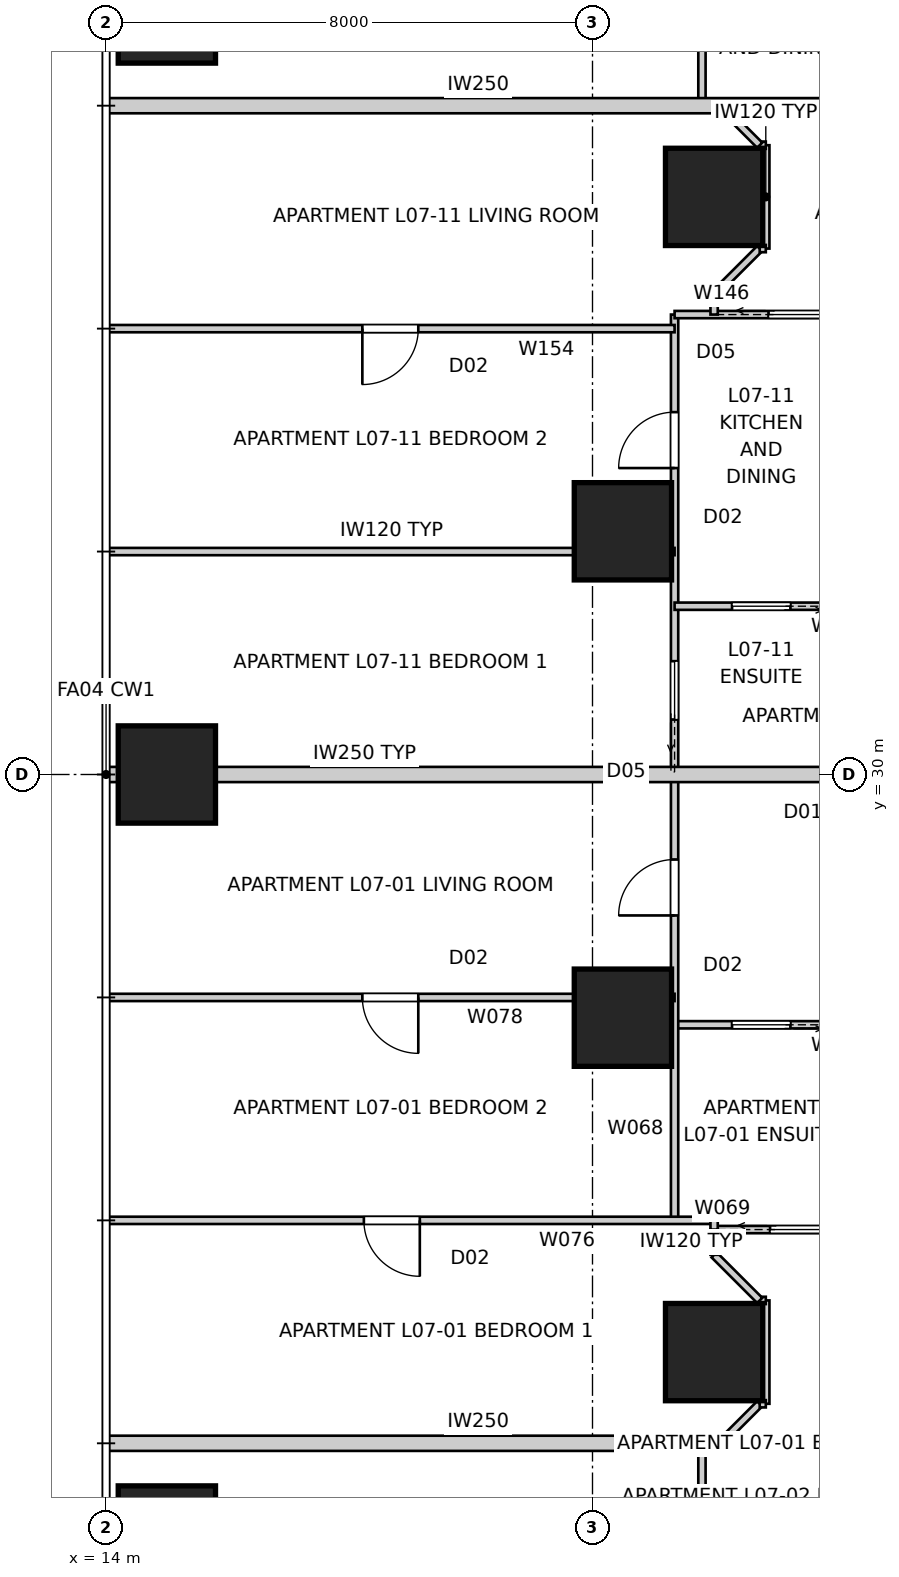
"""IFC4 building model, lengths in metres.
Left out: names, types, materials, properties, quantities, classifications, styles, units other than length and angle.
Written with IfcOpenShell. Run it as: python <this file> out.ifc"""

import sys

from ifc_helpers import new_model, si_unit, direction, frame, frame_2d, origin, origin_2d, place, context, subcontext, project, spatial, rectangle, extrude, element, fill, save


model = new_model("IFC4")
c1 = context("Model", 3, precision=1e-05, world=origin(), true_north=direction((0.0, 1.0)))
c2 = subcontext(c1, "Body", "Model", "MODEL_VIEW")
j1 = project(units=[si_unit("LENGTHUNIT", "METRE"), si_unit("PLANEANGLEUNIT", "RADIAN")], contexts=[c1])
p1 = place(None, origin())
s1 = spatial("IfcSite", under=j1, at=p1, CompositionType="ELEMENT")
p2 = place(p1, origin())
s2 = spatial("IfcBuilding", under=s1, at=p2, CompositionType="ELEMENT")
p3 = place(p2, frame((0.0, 0.0, 28.6)))
s3 = spatial("IfcBuildingStorey", under=s2, at=p3, CompositionType="ELEMENT", Elevation=28.6)
for number, where, z_axis, x_axis in (
    (1, (15.0, 42.5, 0.0), (0.0, 0.0, 1.0), (1.0, 0.0, 0.0)),
    (2, (15.0, 30.0, 0.0), (0.0, 0.0, 1.0), (1.0, 0.0, 0.0)),
    (3, (15.0, 17.5, 0.0), (0.0, 0.0, 1.0), (1.0, 0.0, 0.0)),
    (4, (24.0, 39.5, 0.0), (0.0, 0.0, 1.0), (1.0, 0.0, 0.0)),
    (5, (22.5, 34.0, 0.0), (0.0, 0.0, 1.0), (1.0, 0.0, 0.0)),
    (6, (22.5, 26.0, 0.0), (0.0, 0.0, 1.0), (1.0, 0.0, 0.0)),
    (7, (24.0, 20.5, 0.0), (0.0, 0.0, 1.0), (1.0, 0.0, 0.0)),
):
    element("IfcColumn", number, at=place(p3, frame(where, z_axis=z_axis, x_axis=x_axis)), inside=s3, PredefinedType="COLUMN", context=c2, shape_type="SweptSolid", body=[
        extrude(rectangle(XDim=1.6, YDim=1.6, at=origin_2d()), origin(), (0.0, 0.0, 1.0), 3.4),
    ])
for number, where, z_axis, x_axis in (
    (8, (14.0, 41.0, 0.0), (0.0, 0.0, 1.0), (1.0, 0.0, 0.0)),
    (9, (14.0, 19.0, 0.0), (0.0, 0.0, 1.0), (1.0, 0.0, 0.0)),
):
    element("IfcWall", number, at=place(p3, frame(where, z_axis=z_axis, x_axis=x_axis)), inside=s3, PredefinedType="PARTITIONING", context=c2, shape_type="SweptSolid", body=[
        extrude(rectangle(XDim=12.24, YDim=0.25, at=frame_2d((6.12, 0.0))), origin(), (0.0, 0.0, 1.0), 3.25),
    ])
p4 = place(p3, frame((14.0, 30.0, 0.0), z_axis=(0.0, 0.0, 1.0), x_axis=(1.0, 0.0, 0.0)))
e10 = element("IfcWall", 10, at=p4, inside=s3, PredefinedType="PARTITIONING", context=c2, shape_type="SweptSolid", body=[
    extrude(rectangle(XDim=8.5, YDim=0.25, at=frame_2d((4.25, 0.0))), origin(), (0.0, 0.0, 1.0), 3.25),
])
p5 = place(p3, frame((22.5, 30.0, 0.0), z_axis=(0.0, 0.0, 1.0), x_axis=(1.0, 0.0, 0.0)))
e11 = element("IfcWall", 11, at=p5, inside=s3, PredefinedType="PARTITIONING", context=c2, shape_type="SweptSolid", body=[
    extrude(rectangle(XDim=3.74, YDim=0.25, at=frame_2d((1.87, 0.0))), origin(), (0.0, 0.0, 1.0), 2.796),
])
p6 = place(p3, frame((26.2, 25.884, 0.0), z_axis=(0.0, 0.0, 1.0), x_axis=(-1.0, 0.0, 0.0)))
e12 = element("IfcWall", 12, at=p6, inside=s3, PredefinedType="PARTITIONING", context=c2, shape_type="SweptSolid", body=[
    extrude(rectangle(XDim=2.85, YDim=0.12, at=frame_2d((1.425, 0.0))), origin(), (0.0, 0.0, 1.0), 3.25),
])
p7 = place(p6, frame((0.945, 0.0, 0.0)))
e13 = element("IfcOpeningElement", 13, at=p7, cuts=e12, PredefinedType="OPENING", context=c2, shape_type="SweptSolid", body=[
    extrude(rectangle(XDim=0.96, YDim=2.1, at=frame_2d((0.48, 1.05))), frame((0.0, 0.07, 0.0), z_axis=(0.0, -1.0, 0.0), x_axis=(1.0, 0.0, 0.0)), (0.0, 0.0, 1.0), 0.14),
])
p8 = place(p3, frame((23.35, 22.667, 0.0), z_axis=(0.0, 0.0, 1.0), x_axis=(0.0, 1.0, 0.0)))
e14 = element("IfcWall", 14, at=p8, inside=s3, PredefinedType="PARTITIONING", context=c2, shape_type="SweptSolid", body=[
    extrude(rectangle(XDim=14.898, YDim=0.12, at=frame_2d((7.449, 0.0))), origin(), (0.0, 0.0, 1.0), 2.55),
])
p9 = place(p8, frame((12.373, 0.0, 0.0)))
e15 = element("IfcOpeningElement", 15, at=p9, cuts=e14, PredefinedType="OPENING", context=c2, shape_type="SweptSolid", body=[
    extrude(rectangle(XDim=0.92, YDim=2.34, at=frame_2d((0.46, 1.17))), frame((0.0, 0.07, 0.0), z_axis=(0.0, -1.0, 0.0), x_axis=(1.0, 0.0, 0.0)), (0.0, 0.0, 1.0), 0.14),
])
p10 = place(p8, frame((5.015, 0.0, 0.0)))
e16 = element("IfcOpeningElement", 16, at=p10, cuts=e14, PredefinedType="OPENING", context=c2, shape_type="SweptSolid", body=[
    extrude(rectangle(XDim=0.92, YDim=2.34, at=frame_2d((0.46, 1.17))), frame((0.0, 0.07, 0.0), z_axis=(0.0, -1.0, 0.0), x_axis=(1.0, 0.0, 0.0)), (0.0, 0.0, 1.0), 0.14),
])
p11 = place(p8, frame((8.237, 0.0, 0.0)))
e17 = element("IfcOpeningElement", 17, at=p11, cuts=e14, PredefinedType="OPENING", context=c2, shape_type="SweptSolid", body=[
    extrude(rectangle(XDim=0.96, YDim=2.1, at=frame_2d((0.48, 1.05))), frame((0.0, 0.07, 0.0), z_axis=(0.0, -1.0, 0.0), x_axis=(1.0, 0.0, 0.0)), (0.0, 0.0, 1.0), 0.14),
])
p12 = place(p3, frame((24.0, 22.515, 0.0), z_axis=(0.0, 0.0, 1.0), x_axis=(1.0, 0.0, 0.0)))
e18 = element("IfcWall", 18, at=p12, inside=s3, PredefinedType="PARTITIONING", context=c2, shape_type="SweptSolid", body=[
    extrude(rectangle(XDim=2.2, YDim=0.12, at=frame_2d((1.1, 0.0))), origin(), (0.0, 0.0, 1.0), 3.25),
])
p13 = place(p12, frame((0.92, 0.0, 0.0)))
e19 = element("IfcOpeningElement", 19, at=p13, cuts=e18, PredefinedType="OPENING", context=c2, shape_type="SweptSolid", body=[
    extrude(rectangle(XDim=0.96, YDim=2.1, at=frame_2d((0.48, 1.05))), frame((0.0, 0.07, 0.0), z_axis=(0.0, -1.0, 0.0), x_axis=(1.0, 0.0, 0.0)), (0.0, 0.0, 1.0), 0.14),
])
p14 = place(p3, frame((24.1, 19.0, 0.0), z_axis=(0.0, 0.0, 1.0), x_axis=(0.707106781187, 0.707106781187, 0.0)))
e20 = element("IfcWall", 20, at=p14, inside=s3, PredefinedType="PARTITIONING", context=c2, shape_type="SweptSolid", body=[
    extrude(rectangle(XDim=0.919, YDim=0.12, at=frame_2d((0.459, 0.0))), origin(), (0.0, 0.0, 1.0), 3.25),
])
p15 = place(p3, frame((24.85, 19.65, 0.0), z_axis=(0.0, 0.0, 1.0), x_axis=(0.0, 1.0, 0.0)))
e21 = element("IfcWall", 21, at=p15, inside=s3, PredefinedType="PARTITIONING", context=c2, shape_type="SweptSolid", body=[
    extrude(rectangle(XDim=1.7, YDim=0.12, at=frame_2d((0.85, 0.0))), origin(), (0.0, 0.0, 1.0), 3.25),
])
p16 = place(p3, frame((24.75, 21.35, 0.0), z_axis=(0.0, 0.0, 1.0), x_axis=(-0.707106781187, 0.707106781187, 0.0)))
e22 = element("IfcWall", 22, at=p16, inside=s3, PredefinedType="PARTITIONING", context=c2, shape_type="SweptSolid", body=[
    extrude(rectangle(XDim=1.061, YDim=0.12, at=frame_2d((0.53, 0.0))), origin(), (0.0, 0.0, 1.0), 3.25),
])
p17 = place(p3, frame((24.0, 22.1, 0.0), z_axis=(0.0, 0.0, 1.0), x_axis=(0.0, 1.0, 0.0)))
e23 = element("IfcWall", 23, at=p17, inside=s3, PredefinedType="PARTITIONING", context=c2, shape_type="SweptSolid", body=[
    extrude(rectangle(XDim=0.415, YDim=0.12, at=frame_2d((0.208, 0.0))), origin(), (0.0, 0.0, 1.0), 3.25),
])
p18 = place(p3, frame((24.0, 22.667, 0.0), z_axis=(0.0, 0.0, 1.0), x_axis=(-1.0, 0.0, 0.0)))
e24 = element("IfcWall", 24, at=p18, inside=s3, PredefinedType="PARTITIONING", context=c2, shape_type="SweptSolid", body=[
    extrude(rectangle(XDim=9.96, YDim=0.12, at=frame_2d((4.98, 0.0))), origin(), (0.0, 0.0, 1.0), 3.25),
])
p19 = place(p18, frame((4.84, 0.0, 0.0)))
e25 = element("IfcOpeningElement", 25, at=p19, cuts=e24, PredefinedType="OPENING", context=c2, shape_type="SweptSolid", body=[
    extrude(rectangle(XDim=0.92, YDim=2.34, at=frame_2d((0.46, 1.17))), frame((0.0, 0.07, 0.0), z_axis=(0.0, -1.0, 0.0), x_axis=(1.0, 0.0, 0.0)), (0.0, 0.0, 1.0), 0.14),
])
p20 = place(p3, frame((23.35, 26.333, 0.0), z_axis=(0.0, 0.0, 1.0), x_axis=(-1.0, 0.0, 0.0)))
e26 = element("IfcWall", 26, at=p20, inside=s3, PredefinedType="PARTITIONING", context=c2, shape_type="SweptSolid", body=[
    extrude(rectangle(XDim=9.31, YDim=0.12, at=frame_2d((4.655, 0.0))), origin(), (0.0, 0.0, 1.0), 3.25),
])
p21 = place(p20, frame((4.215, 0.0, 0.0)))
e27 = element("IfcOpeningElement", 27, at=p21, cuts=e26, PredefinedType="OPENING", context=c2, shape_type="SweptSolid", body=[
    extrude(rectangle(XDim=0.92, YDim=2.34, at=frame_2d((0.46, 1.17))), frame((0.0, 0.07, 0.0), z_axis=(0.0, -1.0, 0.0), x_axis=(1.0, 0.0, 0.0)), (0.0, 0.0, 1.0), 0.14),
])
p22 = place(p3, frame((23.8, 15.233, 0.0), z_axis=(0.0, 0.0, 1.0), x_axis=(0.0, 1.0, 0.0)))
e28 = element("IfcWall", 28, at=p22, inside=s3, PredefinedType="PARTITIONING", context=c2, shape_type="SweptSolid", body=[
    extrude(rectangle(XDim=3.767, YDim=0.12, at=frame_2d((1.883, 0.0))), origin(), (0.0, 0.0, 1.0), 3.25),
])
p23 = place(p3, frame((23.8, 41.0, 0.0), z_axis=(0.0, 0.0, 1.0), x_axis=(0.0, 1.0, 0.0)))
e29 = element("IfcWall", 29, at=p23, inside=s3, PredefinedType="PARTITIONING", context=c2, shape_type="SweptSolid", body=[
    extrude(rectangle(XDim=7.333, YDim=0.12, at=frame_2d((3.667, 0.0))), origin(), (0.0, 0.0, 1.0), 3.25),
])
p24 = place(p23, frame((3.207, 0.0, 0.0)))
e30 = element("IfcOpeningElement", 30, at=p24, cuts=e29, PredefinedType="OPENING", context=c2, shape_type="SweptSolid", body=[
    extrude(rectangle(XDim=0.92, YDim=2.34, at=frame_2d((0.46, 1.17))), frame((0.0, 0.07, 0.0), z_axis=(0.0, -1.0, 0.0), x_axis=(1.0, 0.0, 0.0)), (0.0, 0.0, 1.0), 0.14),
])
p25 = place(p3, frame((23.35, 37.565, 0.0), z_axis=(0.0, 0.0, 1.0), x_axis=(1.0, 0.0, 0.0)))
e31 = element("IfcWall", 31, at=p25, inside=s3, PredefinedType="PARTITIONING", context=c2, shape_type="SweptSolid", body=[
    extrude(rectangle(XDim=2.85, YDim=0.12, at=frame_2d((1.425, 0.0))), origin(), (0.0, 0.0, 1.0), 3.25),
])
p26 = place(p25, frame((1.545, 0.0, 0.0)))
e32 = element("IfcOpeningElement", 32, at=p26, cuts=e31, PredefinedType="OPENING", context=c2, shape_type="SweptSolid", body=[
    extrude(rectangle(XDim=0.96, YDim=2.1, at=frame_2d((0.48, 1.05))), frame((0.0, 0.07, 0.0), z_axis=(0.0, -1.0, 0.0), x_axis=(1.0, 0.0, 0.0)), (0.0, 0.0, 1.0), 0.14),
])
p27 = place(p3, frame((26.2, 32.768, 0.0), z_axis=(0.0, 0.0, 1.0), x_axis=(-1.0, 0.0, 0.0)))
e33 = element("IfcWall", 33, at=p27, inside=s3, PredefinedType="PARTITIONING", context=c2, shape_type="SweptSolid", body=[
    extrude(rectangle(XDim=2.85, YDim=0.12, at=frame_2d((1.425, 0.0))), origin(), (0.0, 0.0, 1.0), 3.25),
])
p28 = place(p27, frame((0.945, 0.0, 0.0)))
e34 = element("IfcOpeningElement", 34, at=p28, cuts=e33, PredefinedType="OPENING", context=c2, shape_type="SweptSolid", body=[
    extrude(rectangle(XDim=0.96, YDim=2.1, at=frame_2d((0.48, 1.05))), frame((0.0, 0.07, 0.0), z_axis=(0.0, -1.0, 0.0), x_axis=(1.0, 0.0, 0.0)), (0.0, 0.0, 1.0), 0.14),
])
p29 = place(p3, frame((24.0, 37.565, 0.0), z_axis=(0.0, 0.0, 1.0), x_axis=(0.0, 1.0, 0.0)))
e35 = element("IfcWall", 35, at=p29, inside=s3, PredefinedType="PARTITIONING", context=c2, shape_type="SweptSolid", body=[
    extrude(rectangle(XDim=0.335, YDim=0.12, at=frame_2d((0.167, 0.0))), origin(), (0.0, 0.0, 1.0), 3.25),
])
p30 = place(p3, frame((24.0, 37.9, 0.0), z_axis=(0.0, 0.0, 1.0), x_axis=(0.707106781187, 0.707106781187, 0.0)))
e36 = element("IfcWall", 36, at=p30, inside=s3, PredefinedType="PARTITIONING", context=c2, shape_type="SweptSolid", body=[
    extrude(rectangle(XDim=1.061, YDim=0.12, at=frame_2d((0.53, 0.0))), origin(), (0.0, 0.0, 1.0), 3.25),
])
p31 = place(p3, frame((24.85, 38.65, 0.0), z_axis=(0.0, 0.0, 1.0), x_axis=(0.0, 1.0, 0.0)))
e37 = element("IfcWall", 37, at=p31, inside=s3, PredefinedType="PARTITIONING", context=c2, shape_type="SweptSolid", body=[
    extrude(rectangle(XDim=1.7, YDim=0.12, at=frame_2d((0.85, 0.0))), origin(), (0.0, 0.0, 1.0), 3.25),
])
p32 = place(p3, frame((24.75, 40.35, 0.0), z_axis=(0.0, 0.0, 1.0), x_axis=(-0.707106781187, 0.707106781187, 0.0)))
e38 = element("IfcWall", 38, at=p32, inside=s3, PredefinedType="PARTITIONING", context=c2, shape_type="SweptSolid", body=[
    extrude(rectangle(XDim=0.919, YDim=0.12, at=frame_2d((0.459, 0.0))), origin(), (0.0, 0.0, 1.0), 3.25),
])
p33 = place(p3, frame((23.35, 37.333, 0.0), z_axis=(0.0, 0.0, 1.0), x_axis=(-1.0, 0.0, 0.0)))
e39 = element("IfcWall", 39, at=p33, inside=s3, PredefinedType="PARTITIONING", context=c2, shape_type="SweptSolid", body=[
    extrude(rectangle(XDim=9.31, YDim=0.12, at=frame_2d((4.655, 0.0))), origin(), (0.0, 0.0, 1.0), 3.25),
])
p34 = place(p33, frame((4.215, 0.0, 0.0)))
e40 = element("IfcOpeningElement", 40, at=p34, cuts=e39, PredefinedType="OPENING", context=c2, shape_type="SweptSolid", body=[
    extrude(rectangle(XDim=0.92, YDim=2.34, at=frame_2d((0.46, 1.17))), frame((0.0, 0.07, 0.0), z_axis=(0.0, -1.0, 0.0), x_axis=(1.0, 0.0, 0.0)), (0.0, 0.0, 1.0), 0.14),
])
p35 = place(p3, frame((14.04, 33.667, 0.0), z_axis=(0.0, 0.0, 1.0), x_axis=(1.0, 0.0, 0.0)))
e41 = element("IfcWall", 41, at=p35, inside=s3, PredefinedType="PARTITIONING", context=c2, shape_type="SweptSolid", body=[
    extrude(rectangle(XDim=9.31, YDim=0.12, at=frame_2d((4.655, 0.0))), origin(), (0.0, 0.0, 1.0), 3.25),
])
for number, where, z_axis, x_axis in (
    (42, (24.85, 19.65, 0.0), (0.0, 0.0, 1.0), (-1.0, 0.0, 0.0)),
    (43, (24.85, 21.35, 0.0), (0.0, 0.0, 1.0), (-1.0, 0.0, 0.0)),
):
    element("IfcWall", number, at=place(p3, frame(where, z_axis=z_axis, x_axis=x_axis)), inside=s3, PredefinedType="PARTITIONING", context=c2, shape_type="SweptSolid", body=[
        extrude(rectangle(XDim=0.1, YDim=0.12, at=frame_2d((0.05, 0.0))), origin(), (0.0, 0.0, 1.0), 3.25),
    ])
p36 = place(p3, frame((24.0, 22.667, 0.0), z_axis=(0.0, 0.0, 1.0), x_axis=(0.0, -1.0, 0.0)))
e44 = element("IfcWall", 44, at=p36, inside=s3, PredefinedType="PARTITIONING", context=c2, shape_type="SweptSolid", body=[
    extrude(rectangle(XDim=0.151, YDim=0.12, at=frame_2d((0.076, 0.0))), origin(), (0.0, 0.0, 1.0), 3.25),
])
for number, where, z_axis, x_axis in (
    (45, (24.85, 38.65, 0.0), (0.0, 0.0, 1.0), (-1.0, 0.0, 0.0)),
    (46, (24.85, 40.35, 0.0), (0.0, 0.0, 1.0), (-1.0, 0.0, 0.0)),
):
    element("IfcWall", number, at=place(p3, frame(where, z_axis=z_axis, x_axis=x_axis)), inside=s3, PredefinedType="PARTITIONING", context=c2, shape_type="SweptSolid", body=[
        extrude(rectangle(XDim=0.1, YDim=0.12, at=frame_2d((0.05, 0.0))), origin(), (0.0, 0.0, 1.0), 3.25),
    ])
p37 = place(p9, origin())
e47 = element("IfcDoor", 47, at=p37, inside=s3, OperationType="SINGLE_SWING_LEFT", PredefinedType="DOOR", context=c2, shape_type="SweptSolid", body=[
    extrude(rectangle(XDim=0.92, YDim=2.34, at=frame_2d((0.46, 1.17))), frame((0.0, 0.025, 0.0), z_axis=(0.0, -1.0, 0.0), x_axis=(1.0, 0.0, 0.0)), (0.0, 0.0, 1.0), 0.05),
])
fill(e15, e47)
p38 = place(p28, origin())
e48 = element("IfcDoor", 48, at=p38, inside=s3, OperationType="SLIDING_TO_LEFT", PredefinedType="DOOR", context=c2, shape_type="SweptSolid", body=[
    extrude(rectangle(XDim=0.96, YDim=2.1, at=frame_2d((0.48, 1.05))), frame((0.0, 0.025, 0.0), z_axis=(0.0, -1.0, 0.0), x_axis=(1.0, 0.0, 0.0)), (0.0, 0.0, 1.0), 0.05),
])
fill(e34, e48)
p39 = place(p26, origin())
e49 = element("IfcDoor", 49, at=p39, inside=s3, OperationType="SLIDING_TO_LEFT", PredefinedType="DOOR", context=c2, shape_type="SweptSolid", body=[
    extrude(rectangle(XDim=0.96, YDim=2.1, at=frame_2d((0.48, 1.05))), frame((0.0, 0.025, 0.0), z_axis=(0.0, -1.0, 0.0), x_axis=(1.0, 0.0, 0.0)), (0.0, 0.0, 1.0), 0.05),
])
fill(e32, e49)
p40 = place(p10, origin())
e50 = element("IfcDoor", 50, at=p40, inside=s3, OperationType="SINGLE_SWING_LEFT", PredefinedType="DOOR", context=c2, shape_type="SweptSolid", body=[
    extrude(rectangle(XDim=0.92, YDim=2.34, at=frame_2d((0.46, 1.17))), frame((0.0, 0.025, 0.0), z_axis=(0.0, -1.0, 0.0), x_axis=(1.0, 0.0, 0.0)), (0.0, 0.0, 1.0), 0.05),
])
fill(e16, e50)
p41 = place(p7, origin())
e51 = element("IfcDoor", 51, at=p41, inside=s3, OperationType="SLIDING_TO_LEFT", PredefinedType="DOOR", context=c2, shape_type="SweptSolid", body=[
    extrude(rectangle(XDim=0.96, YDim=2.1, at=frame_2d((0.48, 1.05))), frame((0.0, 0.025, 0.0), z_axis=(0.0, -1.0, 0.0), x_axis=(1.0, 0.0, 0.0)), (0.0, 0.0, 1.0), 0.05),
])
fill(e13, e51)
p42 = place(p11, origin())
e52 = element("IfcDoor", 52, at=p42, inside=s3, OperationType="SLIDING_TO_LEFT", PredefinedType="DOOR", context=c2, shape_type="SweptSolid", body=[
    extrude(rectangle(XDim=0.96, YDim=2.1, at=frame_2d((0.48, 1.05))), frame((0.0, 0.025, 0.0), z_axis=(0.0, -1.0, 0.0), x_axis=(1.0, 0.0, 0.0)), (0.0, 0.0, 1.0), 0.05),
])
fill(e17, e52)
p43 = place(p21, origin())
e53 = element("IfcDoor", 53, at=p43, inside=s3, OperationType="SINGLE_SWING_LEFT", PredefinedType="DOOR", context=c2, shape_type="SweptSolid", body=[
    extrude(rectangle(XDim=0.92, YDim=2.34, at=frame_2d((0.46, 1.17))), frame((0.0, 0.025, 0.0), z_axis=(0.0, -1.0, 0.0), x_axis=(1.0, 0.0, 0.0)), (0.0, 0.0, 1.0), 0.05),
])
fill(e27, e53)
p44 = place(p13, origin())
e54 = element("IfcDoor", 54, at=p44, inside=s3, OperationType="SLIDING_TO_LEFT", PredefinedType="DOOR", context=c2, shape_type="SweptSolid", body=[
    extrude(rectangle(XDim=0.96, YDim=2.1, at=frame_2d((0.48, 1.05))), frame((0.0, 0.025, 0.0), z_axis=(0.0, -1.0, 0.0), x_axis=(1.0, 0.0, 0.0)), (0.0, 0.0, 1.0), 0.05),
])
fill(e19, e54)
p45 = place(p34, origin())
e55 = element("IfcDoor", 55, at=p45, inside=s3, OperationType="SINGLE_SWING_RIGHT", PredefinedType="DOOR", context=c2, shape_type="SweptSolid", body=[
    extrude(rectangle(XDim=0.92, YDim=2.34, at=frame_2d((0.46, 1.17))), frame((0.0, 0.025, 0.0), z_axis=(0.0, -1.0, 0.0), x_axis=(1.0, 0.0, 0.0)), (0.0, 0.0, 1.0), 0.05),
])
fill(e40, e55)
p46 = place(p19, origin())
e56 = element("IfcDoor", 56, at=p46, inside=s3, OperationType="SINGLE_SWING_LEFT", PredefinedType="DOOR", context=c2, shape_type="SweptSolid", body=[
    extrude(rectangle(XDim=0.92, YDim=2.34, at=frame_2d((0.46, 1.17))), frame((0.0, 0.025, 0.0), z_axis=(0.0, -1.0, 0.0), x_axis=(1.0, 0.0, 0.0)), (0.0, 0.0, 1.0), 0.05),
])
fill(e25, e56)
save(model, sys.argv[1])
